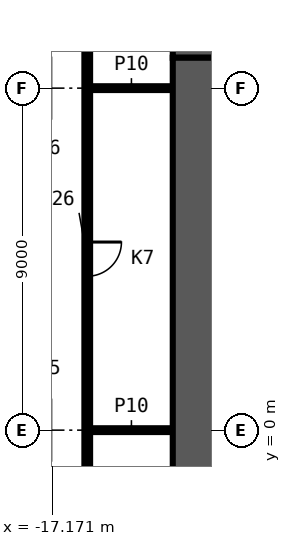
"""IFC4 building model, lengths in metres.
Left out: names, types, materials, properties, quantities, classifications, styles, units other than length and angle.
Written with IfcOpenShell. Run it as: python <this file> out.ifc"""

import sys

from ifc_helpers import new_model, si_unit, direction, frame, frame_2d, origin, place, context, subcontext, project, spatial, rectangle, extrude, element, fill, save


model = new_model("IFC4")
c1 = context("Model", 3, precision=1e-05, world=origin(), true_north=direction((0.0, 1.0)))
c2 = subcontext(c1, "Body", "Model", "MODEL_VIEW")
j1 = project(units=[si_unit("LENGTHUNIT", "METRE"), si_unit("PLANEANGLEUNIT", "RADIAN")], contexts=[c1])
p1 = place(None, origin())
s1 = spatial("IfcSite", under=j1, at=p1, CompositionType="ELEMENT")
p2 = place(p1, origin())
s2 = spatial("IfcBuilding", under=s1, at=p2, CompositionType="ELEMENT")
p3 = place(p2, frame((0.0, 0.0, 47.7)))
s3 = spatial("IfcBuildingStorey", under=s2, at=p3, CompositionType="ELEMENT", Elevation=47.7)
for number, where, z_axis, x_axis in (
    (1, (-16.175, 0.0, 0.0), (0.0, 0.0, 1.0), (1.0, 0.0, 0.0)),
    (2, (-16.175, 9.0, 0.0), (0.0, 0.0, 1.0), (1.0, 0.0, 0.0)),
):
    element("IfcWall", number, at=place(p3, frame(where, z_axis=z_axis, x_axis=x_axis)), inside=s3, PredefinedType="PARTITIONING", context=c2, shape_type="SweptSolid", body=[
        extrude(rectangle(XDim=2.175, YDim=0.1, at=frame_2d((1.087, 0.0))), origin(), (0.0, 0.0, 1.0), 3.3),
    ])
p4 = place(p3, frame((-16.25, 13.175, 0.0), z_axis=(0.0, 0.0, 1.0), x_axis=(0.0, -1.0, 0.0)))
e3 = element("IfcWall", 3, at=p4, inside=s3, PredefinedType="PARTITIONING", context=c2, shape_type="SweptSolid", body=[
    extrude(rectangle(XDim=26.35, YDim=0.15, at=frame_2d((13.175, 0.0))), origin(), (0.0, 0.0, 1.0), 3.3),
])
p5 = place(p4, frame((17.225, 0.0, 0.0)))
e4 = element("IfcOpeningElement", 4, at=p5, cuts=e3, PredefinedType="OPENING", context=c2, shape_type="SweptSolid", body=[
    extrude(rectangle(XDim=0.9, YDim=2.1, at=frame_2d((0.45, 1.05))), frame((0.0, 0.085, 0.0), z_axis=(0.0, -1.0, 0.0), x_axis=(1.0, 0.0, 0.0)), (0.0, 0.0, 1.0), 0.17),
])
p6 = place(p4, frame((8.225, 0.0, 0.0)))
e5 = element("IfcOpeningElement", 5, at=p6, cuts=e3, PredefinedType="OPENING", context=c2, shape_type="SweptSolid", body=[
    extrude(rectangle(XDim=0.9, YDim=2.1, at=frame_2d((0.45, 1.05))), frame((0.0, 0.085, 0.0), z_axis=(0.0, -1.0, 0.0), x_axis=(1.0, 0.0, 0.0)), (0.0, 0.0, 1.0), 0.17),
])
p7 = place(p3, frame((-14.0, 10.4, 0.0), z_axis=(0.0, 0.0, 1.0), x_axis=(1.0, 0.0, 0.0)))
e6 = element("IfcWall", 6, at=p7, inside=s3, PredefinedType="SHEAR", context=c2, shape_type="SweptSolid", body=[
    extrude(rectangle(XDim=28.0, YDim=1.2, at=frame_2d((14.0, 0.0))), origin(), (0.0, 0.0, 1.0), 3.3),
])
p8 = place(p7, frame((15.9, 0.0, 0.0)))
e7 = element("IfcOpeningElement", 7, at=p8, cuts=e6, PredefinedType="OPENING", context=c2, shape_type="SweptSolid", body=[
    extrude(rectangle(XDim=1.6, YDim=2.1, at=frame_2d((0.8, 1.05))), frame((0.0, 0.61, 0.0), z_axis=(0.0, -1.0, 0.0), x_axis=(1.0, 0.0, 0.0)), (0.0, 0.0, 1.0), 1.22),
])
p9 = place(p3, frame((-13.4, -9.8, 0.0), z_axis=(0.0, 0.0, 1.0), x_axis=(0.0, 1.0, 0.0)))
e8 = element("IfcWall", 8, at=p9, inside=s3, PredefinedType="SHEAR", context=c2, shape_type="SweptSolid", body=[
    extrude(rectangle(XDim=19.6, YDim=1.2, at=frame_2d((9.8, 0.0))), origin(), (0.0, 0.0, 1.0), 3.3),
])
p10 = place(p6, origin())
e9 = element("IfcDoor", 9, at=p10, inside=s3, OperationType="SINGLE_SWING_RIGHT", PredefinedType="DOOR", context=c2, shape_type="SweptSolid", body=[
    extrude(rectangle(XDim=0.9, YDim=2.1, at=frame_2d((0.45, 1.05))), frame((0.0, 0.025, 0.0), z_axis=(0.0, -1.0, 0.0), x_axis=(1.0, 0.0, 0.0)), (0.0, 0.0, 1.0), 0.05),
])
fill(e5, e9)
save(model, sys.argv[1])
